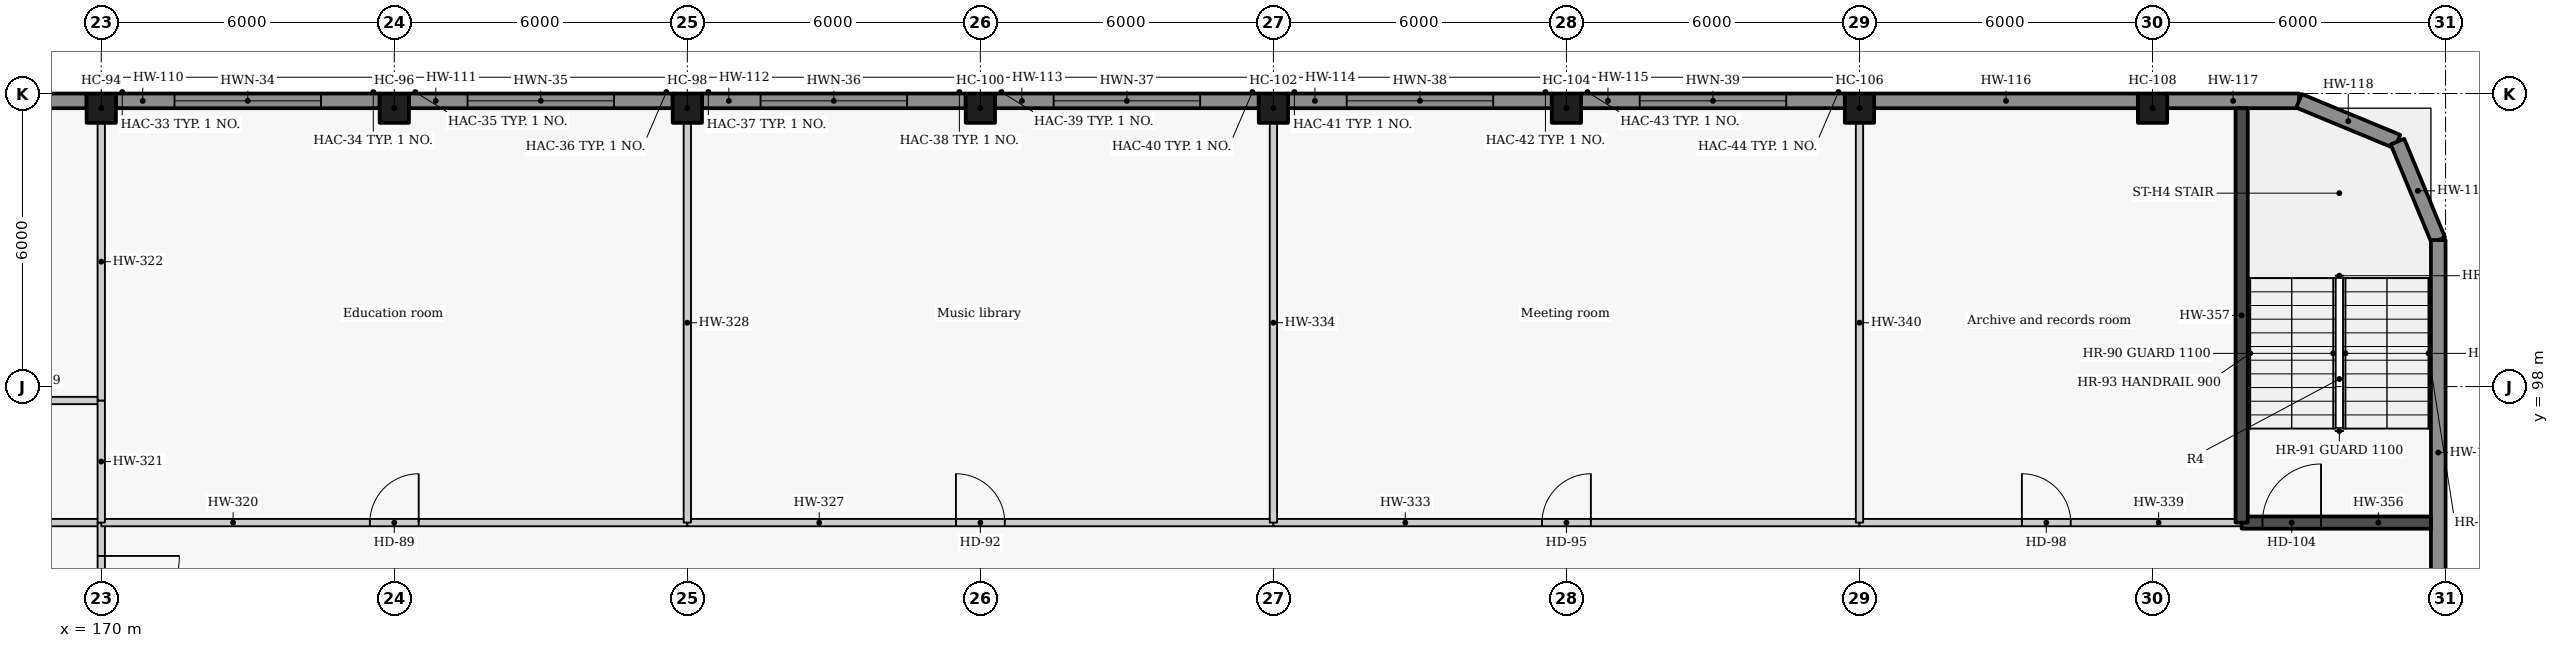
"""IFC4 building model, lengths in metres.
Left out: names, types, materials, properties, quantities, classifications, styles, units other than length and angle.
Written with IfcOpenShell. Run it as: python <this file> out.ifc"""

import sys

from ifc_helpers import new_model, si_unit, direction, frame, frame_2d, origin, origin_2d, place, context, subcontext, project, spatial, rectangle, extrude, element, fill, save


model = new_model("IFC4")
c1 = context("Model", 3, precision=1e-05, world=origin(), true_north=direction((0.0, 1.0)))
c2 = subcontext(c1, "Body", "Model", "MODEL_VIEW")
j1 = project(units=[si_unit("LENGTHUNIT", "METRE"), si_unit("PLANEANGLEUNIT", "RADIAN")], contexts=[c1])
p1 = place(None, origin())
s1 = spatial("IfcSite", under=j1, at=p1, CompositionType="ELEMENT")
p2 = place(p1, origin())
s2 = spatial("IfcBuilding", under=s1, at=p2, CompositionType="ELEMENT")
p3 = place(p2, frame((0.0, 0.0, 11.4)))
s3 = spatial("IfcBuildingStorey", under=s2, at=p3, CompositionType="ELEMENT", Elevation=11.4)
for number, where, z_axis, x_axis in (
    (1, (170.0, 103.7, 0.0), (0.0, 0.0, 1.0), (1.0, 0.0, 0.0)),
    (2, (176.0, 103.7, 0.0), (0.0, 0.0, 1.0), (1.0, 0.0, 0.0)),
    (3, (182.0, 103.7, 0.0), (0.0, 0.0, 1.0), (1.0, 0.0, 0.0)),
    (4, (188.0, 103.7, 0.0), (0.0, 0.0, 1.0), (1.0, 0.0, 0.0)),
    (5, (194.0, 103.7, 0.0), (0.0, 0.0, 1.0), (1.0, 0.0, 0.0)),
    (6, (200.0, 103.7, 0.0), (0.0, 0.0, 1.0), (1.0, 0.0, 0.0)),
    (7, (206.0, 103.7, 0.0), (0.0, 0.0, 1.0), (1.0, 0.0, 0.0)),
    (8, (212.0, 103.7, 0.0), (0.0, 0.0, 1.0), (1.0, 0.0, 0.0)),
):
    element("IfcColumn", number, at=place(p3, frame(where, z_axis=z_axis, x_axis=x_axis)), inside=s3, PredefinedType="COLUMN", context=c2, shape_type="SweptSolid", body=[
        extrude(rectangle(XDim=0.6, YDim=0.6, at=origin_2d()), origin(), (0.0, 0.0, 1.0), 4.2),
    ])
p4 = place(p3, frame((164.3, 103.85, 0.0), z_axis=(0.0, 0.0, 1.0), x_axis=(1.0, 0.0, 0.0)))
e9 = element("IfcWall", 9, at=p4, inside=s3, PredefinedType="SOLIDWALL", context=c2, shape_type="SweptSolid", body=[
    extrude(rectangle(XDim=5.4, YDim=0.3, at=frame_2d((2.7, 0.0))), origin(), (0.0, 0.0, 1.0), 4.2),
])
p5 = place(p3, frame((170.3, 103.85, 0.0), z_axis=(0.0, 0.0, 1.0), x_axis=(1.0, 0.0, 0.0)))
e10 = element("IfcWall", 10, at=p5, inside=s3, PredefinedType="SOLIDWALL", context=c2, shape_type="SweptSolid", body=[
    extrude(rectangle(XDim=5.4, YDim=0.3, at=frame_2d((2.7, 0.0))), origin(), (0.0, 0.0, 1.0), 4.2),
])
p6 = place(p5, frame((1.2, 0.0, 0.9)))
e11 = element("IfcOpeningElement", 11, at=p6, cuts=e10, PredefinedType="OPENING", context=c2, shape_type="SweptSolid", body=[
    extrude(rectangle(XDim=3.0, YDim=1.8, at=frame_2d((1.5, 0.9))), frame((0.0, 0.16, 0.0), z_axis=(0.0, -1.0, 0.0), x_axis=(1.0, 0.0, 0.0)), (0.0, 0.0, 1.0), 0.32),
])
p7 = place(p3, frame((176.3, 103.85, 0.0), z_axis=(0.0, 0.0, 1.0), x_axis=(1.0, 0.0, 0.0)))
e12 = element("IfcWall", 12, at=p7, inside=s3, PredefinedType="SOLIDWALL", context=c2, shape_type="SweptSolid", body=[
    extrude(rectangle(XDim=5.4, YDim=0.3, at=frame_2d((2.7, 0.0))), origin(), (0.0, 0.0, 1.0), 4.2),
])
p8 = place(p7, frame((1.2, 0.0, 0.9)))
e13 = element("IfcOpeningElement", 13, at=p8, cuts=e12, PredefinedType="OPENING", context=c2, shape_type="SweptSolid", body=[
    extrude(rectangle(XDim=3.0, YDim=1.8, at=frame_2d((1.5, 0.9))), frame((0.0, 0.16, 0.0), z_axis=(0.0, -1.0, 0.0), x_axis=(1.0, 0.0, 0.0)), (0.0, 0.0, 1.0), 0.32),
])
p9 = place(p3, frame((182.3, 103.85, 0.0), z_axis=(0.0, 0.0, 1.0), x_axis=(1.0, 0.0, 0.0)))
e14 = element("IfcWall", 14, at=p9, inside=s3, PredefinedType="SOLIDWALL", context=c2, shape_type="SweptSolid", body=[
    extrude(rectangle(XDim=5.4, YDim=0.3, at=frame_2d((2.7, 0.0))), origin(), (0.0, 0.0, 1.0), 4.2),
])
p10 = place(p9, frame((1.2, 0.0, 0.9)))
e15 = element("IfcOpeningElement", 15, at=p10, cuts=e14, PredefinedType="OPENING", context=c2, shape_type="SweptSolid", body=[
    extrude(rectangle(XDim=3.0, YDim=1.8, at=frame_2d((1.5, 0.9))), frame((0.0, 0.16, 0.0), z_axis=(0.0, -1.0, 0.0), x_axis=(1.0, 0.0, 0.0)), (0.0, 0.0, 1.0), 0.32),
])
p11 = place(p3, frame((188.3, 103.85, 0.0), z_axis=(0.0, 0.0, 1.0), x_axis=(1.0, 0.0, 0.0)))
e16 = element("IfcWall", 16, at=p11, inside=s3, PredefinedType="SOLIDWALL", context=c2, shape_type="SweptSolid", body=[
    extrude(rectangle(XDim=5.4, YDim=0.3, at=frame_2d((2.7, 0.0))), origin(), (0.0, 0.0, 1.0), 4.2),
])
p12 = place(p11, frame((1.2, 0.0, 0.9)))
e17 = element("IfcOpeningElement", 17, at=p12, cuts=e16, PredefinedType="OPENING", context=c2, shape_type="SweptSolid", body=[
    extrude(rectangle(XDim=3.0, YDim=1.8, at=frame_2d((1.5, 0.9))), frame((0.0, 0.16, 0.0), z_axis=(0.0, -1.0, 0.0), x_axis=(1.0, 0.0, 0.0)), (0.0, 0.0, 1.0), 0.32),
])
p13 = place(p3, frame((194.3, 103.85, 0.0), z_axis=(0.0, 0.0, 1.0), x_axis=(1.0, 0.0, 0.0)))
e18 = element("IfcWall", 18, at=p13, inside=s3, PredefinedType="SOLIDWALL", context=c2, shape_type="SweptSolid", body=[
    extrude(rectangle(XDim=5.4, YDim=0.3, at=frame_2d((2.7, 0.0))), origin(), (0.0, 0.0, 1.0), 4.2),
])
p14 = place(p13, frame((1.2, 0.0, 0.9)))
e19 = element("IfcOpeningElement", 19, at=p14, cuts=e18, PredefinedType="OPENING", context=c2, shape_type="SweptSolid", body=[
    extrude(rectangle(XDim=3.0, YDim=1.8, at=frame_2d((1.5, 0.9))), frame((0.0, 0.16, 0.0), z_axis=(0.0, -1.0, 0.0), x_axis=(1.0, 0.0, 0.0)), (0.0, 0.0, 1.0), 0.32),
])
p15 = place(p3, frame((200.3, 103.85, 0.0), z_axis=(0.0, 0.0, 1.0), x_axis=(1.0, 0.0, 0.0)))
e20 = element("IfcWall", 20, at=p15, inside=s3, PredefinedType="SOLIDWALL", context=c2, shape_type="SweptSolid", body=[
    extrude(rectangle(XDim=5.4, YDim=0.3, at=frame_2d((2.7, 0.0))), origin(), (0.0, 0.0, 1.0), 4.2),
])
p16 = place(p15, frame((1.2, 0.0, 0.9)))
e21 = element("IfcOpeningElement", 21, at=p16, cuts=e20, PredefinedType="OPENING", context=c2, shape_type="SweptSolid", body=[
    extrude(rectangle(XDim=3.0, YDim=1.8, at=frame_2d((1.5, 0.9))), frame((0.0, 0.16, 0.0), z_axis=(0.0, -1.0, 0.0), x_axis=(1.0, 0.0, 0.0)), (0.0, 0.0, 1.0), 0.32),
])
p17 = place(p3, frame((206.3, 103.85, 0.0), z_axis=(0.0, 0.0, 1.0), x_axis=(1.0, 0.0, 0.0)))
e22 = element("IfcWall", 22, at=p17, inside=s3, PredefinedType="SOLIDWALL", context=c2, shape_type="SweptSolid", body=[
    extrude(rectangle(XDim=5.4, YDim=0.3, at=frame_2d((2.7, 0.0))), origin(), (0.0, 0.0, 1.0), 4.2),
])
p18 = place(p3, frame((212.3, 103.85, 0.0), z_axis=(0.0, 0.0, 1.0), x_axis=(1.0, 0.0, 0.0)))
e23 = element("IfcWall", 23, at=p18, inside=s3, PredefinedType="SOLIDWALL", context=c2, shape_type="SweptSolid", body=[
    extrude(rectangle(XDim=2.7, YDim=0.3, at=frame_2d((1.35, 0.0))), origin(), (0.0, 0.0, 1.0), 4.2),
])
for number, where, z_axis, x_axis in (
    (24, (215.0, 103.85, 0.0), (0.0, 0.0, 1.0), (0.924, -0.383, 0.0)),
    (25, (217.015, 103.015, 0.0), (0.0, 0.0, 1.0), (0.383, -0.924, 0.0)),
):
    element("IfcWall", number, at=place(p3, frame(where, z_axis=z_axis, x_axis=x_axis)), inside=s3, PredefinedType="SOLIDWALL", context=c2, shape_type="SweptSolid", body=[
        extrude(rectangle(XDim=2.181, YDim=0.3, at=frame_2d((1.091, 0.0))), origin(), (0.0, 0.0, 1.0), 4.2),
    ])
p19 = place(p3, frame((217.85, 101.0, 0.0), z_axis=(0.0, 0.0, 1.0), x_axis=(0.0, -1.0, 0.0)))
e26 = element("IfcWall", 26, at=p19, inside=s3, PredefinedType="SOLIDWALL", context=c2, shape_type="SweptSolid", body=[
    extrude(rectangle(XDim=8.7, YDim=0.3, at=frame_2d((4.35, 0.0))), origin(), (0.0, 0.0, 1.0), 4.2),
])
p20 = place(p3, frame((156.175, 95.215, 0.0), z_axis=(0.0, 0.0, 1.0), x_axis=(1.0, 0.0, 0.0)))
e27 = element("IfcWall", 27, at=p20, inside=s3, PredefinedType="PARTITIONING", context=c2, shape_type="SweptSolid", body=[
    extrude(rectangle(XDim=13.825, YDim=0.15, at=frame_2d((6.913, 0.0))), origin(), (0.0, 0.0, 1.0), 3.85),
])
p21 = place(p20, frame((6.025, 0.0, 0.0)))
e28 = element("IfcOpeningElement", 28, at=p21, cuts=e27, PredefinedType="OPENING", context=c2, shape_type="SweptSolid", body=[
    extrude(rectangle(XDim=1.6, YDim=2.1, at=frame_2d((0.8, 1.05))), frame((0.0, 0.085, 0.0), z_axis=(0.0, -1.0, 0.0), x_axis=(1.0, 0.0, 0.0)), (0.0, 0.0, 1.0), 0.17),
])
p22 = place(p3, frame((164.3, 97.715, 0.0), z_axis=(0.0, 0.0, 1.0), x_axis=(1.0, 0.0, 0.0)))
e29 = element("IfcWall", 29, at=p22, inside=s3, PredefinedType="PLUMBINGWALL", context=c2, shape_type="SweptSolid", body=[
    extrude(rectangle(XDim=5.7, YDim=0.15, at=frame_2d((2.85, 0.0))), origin(), (0.0, 0.0, 1.0), 3.85),
])
p23 = place(p22, frame((2.0, 0.0, 0.0)))
e30 = element("IfcOpeningElement", 30, at=p23, cuts=e29, PredefinedType="OPENING", context=c2, shape_type="SweptSolid", body=[
    extrude(rectangle(XDim=0.9, YDim=2.1, at=frame_2d((0.45, 1.05))), frame((0.0, 0.085, 0.0), z_axis=(0.0, -1.0, 0.0), x_axis=(1.0, 0.0, 0.0)), (0.0, 0.0, 1.0), 0.17),
])
p24 = place(p3, frame((170.0, 95.215, 0.0), z_axis=(0.0, 0.0, 1.0), x_axis=(0.0, -1.0, 0.0)))
e31 = element("IfcWall", 31, at=p24, inside=s3, PredefinedType="PARTITIONING", context=c2, shape_type="SweptSolid", body=[
    extrude(rectangle(XDim=2.965, YDim=0.15, at=frame_2d((1.482, 0.0))), origin(), (0.0, 0.0, 1.0), 3.85),
])
p25 = place(p24, frame((0.683, 0.0, 0.0)))
e32 = element("IfcOpeningElement", 32, at=p25, cuts=e31, PredefinedType="OPENING", context=c2, shape_type="SweptSolid", body=[
    extrude(rectangle(XDim=1.6, YDim=2.1, at=frame_2d((0.8, 1.05))), frame((0.0, 0.085, 0.0), z_axis=(0.0, -1.0, 0.0), x_axis=(1.0, 0.0, 0.0)), (0.0, 0.0, 1.0), 0.17),
])
p26 = place(p3, frame((170.0, 95.215, 0.0), z_axis=(0.0, 0.0, 1.0), x_axis=(1.0, 0.0, 0.0)))
e33 = element("IfcWall", 33, at=p26, inside=s3, PredefinedType="PARTITIONING", context=c2, shape_type="SweptSolid", body=[
    extrude(rectangle(XDim=12.0, YDim=0.15, at=frame_2d((6.0, 0.0))), origin(), (0.0, 0.0, 1.0), 3.85),
])
p27 = place(p26, frame((5.5, 0.0, 0.0)))
e34 = element("IfcOpeningElement", 34, at=p27, cuts=e33, PredefinedType="OPENING", context=c2, shape_type="SweptSolid", body=[
    extrude(rectangle(XDim=1.0, YDim=2.1, at=frame_2d((0.5, 1.05))), frame((0.0, 0.085, 0.0), z_axis=(0.0, -1.0, 0.0), x_axis=(1.0, 0.0, 0.0)), (0.0, 0.0, 1.0), 0.17),
])
p28 = place(p3, frame((170.0, 97.715, 0.0), z_axis=(0.0, 0.0, 1.0), x_axis=(0.0, -1.0, 0.0)))
e35 = element("IfcWall", 35, at=p28, inside=s3, PredefinedType="PARTITIONING", context=c2, shape_type="SweptSolid", body=[
    extrude(rectangle(XDim=2.5, YDim=0.15, at=frame_2d((1.25, 0.0))), origin(), (0.0, 0.0, 1.0), 3.85),
])
p29 = place(p3, frame((170.0, 103.4, 0.0), z_axis=(0.0, 0.0, 1.0), x_axis=(0.0, -1.0, 0.0)))
e36 = element("IfcWall", 36, at=p29, inside=s3, PredefinedType="PLUMBINGWALL", context=c2, shape_type="SweptSolid", body=[
    extrude(rectangle(XDim=5.685, YDim=0.15, at=frame_2d((2.842, 0.0))), origin(), (0.0, 0.0, 1.0), 3.85),
])
p30 = place(p3, frame((182.0, 95.215, 0.0), z_axis=(0.0, 0.0, 1.0), x_axis=(1.0, 0.0, 0.0)))
e37 = element("IfcWall", 37, at=p30, inside=s3, PredefinedType="PARTITIONING", context=c2, shape_type="SweptSolid", body=[
    extrude(rectangle(XDim=12.0, YDim=0.15, at=frame_2d((6.0, 0.0))), origin(), (0.0, 0.0, 1.0), 3.85),
])
p31 = place(p30, frame((5.5, 0.0, 0.0)))
e38 = element("IfcOpeningElement", 38, at=p31, cuts=e37, PredefinedType="OPENING", context=c2, shape_type="SweptSolid", body=[
    extrude(rectangle(XDim=1.0, YDim=2.1, at=frame_2d((0.5, 1.05))), frame((0.0, 0.085, 0.0), z_axis=(0.0, -1.0, 0.0), x_axis=(1.0, 0.0, 0.0)), (0.0, 0.0, 1.0), 0.17),
])
p32 = place(p3, frame((182.0, 103.4, 0.0), z_axis=(0.0, 0.0, 1.0), x_axis=(0.0, -1.0, 0.0)))
e39 = element("IfcWall", 39, at=p32, inside=s3, PredefinedType="PARTITIONING", context=c2, shape_type="SweptSolid", body=[
    extrude(rectangle(XDim=8.185, YDim=0.15, at=frame_2d((4.092, 0.0))), origin(), (0.0, 0.0, 1.0), 3.85),
])
p33 = place(p3, frame((194.0, 95.215, 0.0), z_axis=(0.0, 0.0, 1.0), x_axis=(1.0, 0.0, 0.0)))
e40 = element("IfcWall", 40, at=p33, inside=s3, PredefinedType="PARTITIONING", context=c2, shape_type="SweptSolid", body=[
    extrude(rectangle(XDim=12.0, YDim=0.15, at=frame_2d((6.0, 0.0))), origin(), (0.0, 0.0, 1.0), 3.85),
])
p34 = place(p33, frame((5.5, 0.0, 0.0)))
e41 = element("IfcOpeningElement", 41, at=p34, cuts=e40, PredefinedType="OPENING", context=c2, shape_type="SweptSolid", body=[
    extrude(rectangle(XDim=1.0, YDim=2.1, at=frame_2d((0.5, 1.05))), frame((0.0, 0.085, 0.0), z_axis=(0.0, -1.0, 0.0), x_axis=(1.0, 0.0, 0.0)), (0.0, 0.0, 1.0), 0.17),
])
p35 = place(p3, frame((194.0, 103.4, 0.0), z_axis=(0.0, 0.0, 1.0), x_axis=(0.0, -1.0, 0.0)))
e42 = element("IfcWall", 42, at=p35, inside=s3, PredefinedType="PARTITIONING", context=c2, shape_type="SweptSolid", body=[
    extrude(rectangle(XDim=8.185, YDim=0.15, at=frame_2d((4.092, 0.0))), origin(), (0.0, 0.0, 1.0), 3.85),
])
p36 = place(p3, frame((206.0, 95.215, 0.0), z_axis=(0.0, 0.0, 1.0), x_axis=(1.0, 0.0, 0.0)))
e43 = element("IfcWall", 43, at=p36, inside=s3, PredefinedType="PARTITIONING", context=c2, shape_type="SweptSolid", body=[
    extrude(rectangle(XDim=7.825, YDim=0.15, at=frame_2d((3.913, 0.0))), origin(), (0.0, 0.0, 1.0), 3.85),
])
p37 = place(p36, frame((3.325, 0.0, 0.0)))
e44 = element("IfcOpeningElement", 44, at=p37, cuts=e43, PredefinedType="OPENING", context=c2, shape_type="SweptSolid", body=[
    extrude(rectangle(XDim=1.0, YDim=2.1, at=frame_2d((0.5, 1.05))), frame((0.0, 0.085, 0.0), z_axis=(0.0, -1.0, 0.0), x_axis=(1.0, 0.0, 0.0)), (0.0, 0.0, 1.0), 0.17),
])
p38 = place(p3, frame((206.0, 103.4, 0.0), z_axis=(0.0, 0.0, 1.0), x_axis=(0.0, -1.0, 0.0)))
e45 = element("IfcWall", 45, at=p38, inside=s3, PredefinedType="PARTITIONING", context=c2, shape_type="SweptSolid", body=[
    extrude(rectangle(XDim=8.185, YDim=0.15, at=frame_2d((4.092, 0.0))), origin(), (0.0, 0.0, 1.0), 3.85),
])
p39 = place(p3, frame((213.825, 95.215, 0.0), z_axis=(0.0, 0.0, 1.0), x_axis=(1.0, 0.0, 0.0)))
e46 = element("IfcWall", 46, at=p39, inside=s3, PredefinedType="SOLIDWALL", context=c2, shape_type="SweptSolid", body=[
    extrude(rectangle(XDim=3.875, YDim=0.25, at=frame_2d((1.938, 0.0))), origin(), (0.0, 0.0, 1.0), 4.2),
])
p40 = place(p39, frame((0.425, 0.0, 0.0)))
e47 = element("IfcOpeningElement", 47, at=p40, cuts=e46, PredefinedType="OPENING", context=c2, shape_type="SweptSolid", body=[
    extrude(rectangle(XDim=1.2, YDim=2.1, at=frame_2d((0.6, 1.05))), frame((0.0, 0.135, 0.0), z_axis=(0.0, -1.0, 0.0), x_axis=(1.0, 0.0, 0.0)), (0.0, 0.0, 1.0), 0.27),
])
p41 = place(p3, frame((213.825, 95.215, 0.0), z_axis=(0.0, 0.0, 1.0), x_axis=(0.0, 1.0, 0.0)))
e48 = element("IfcWall", 48, at=p41, inside=s3, PredefinedType="SOLIDWALL", context=c2, shape_type="SweptSolid", body=[
    extrude(rectangle(XDim=8.485, YDim=0.25, at=frame_2d((4.242, 0.0))), origin(), (0.0, 0.0, 1.0), 4.2),
])
p42 = place(p6, origin())
e49 = element("IfcWindow", 49, at=p42, inside=s3, PartitioningType="SINGLE_PANEL", PredefinedType="WINDOW", context=c2, shape_type="SweptSolid", body=[
    extrude(rectangle(XDim=3.0, YDim=1.8, at=frame_2d((1.5, 0.9))), frame((0.0, 0.03, 0.0), z_axis=(0.0, -1.0, 0.0), x_axis=(1.0, 0.0, 0.0)), (0.0, 0.0, 1.0), 0.06),
])
fill(e11, e49)
p43 = place(p8, origin())
e50 = element("IfcWindow", 50, at=p43, inside=s3, PartitioningType="SINGLE_PANEL", PredefinedType="WINDOW", context=c2, shape_type="SweptSolid", body=[
    extrude(rectangle(XDim=3.0, YDim=1.8, at=frame_2d((1.5, 0.9))), frame((0.0, 0.03, 0.0), z_axis=(0.0, -1.0, 0.0), x_axis=(1.0, 0.0, 0.0)), (0.0, 0.0, 1.0), 0.06),
])
fill(e13, e50)
p44 = place(p10, origin())
e51 = element("IfcWindow", 51, at=p44, inside=s3, PartitioningType="SINGLE_PANEL", PredefinedType="WINDOW", context=c2, shape_type="SweptSolid", body=[
    extrude(rectangle(XDim=3.0, YDim=1.8, at=frame_2d((1.5, 0.9))), frame((0.0, 0.03, 0.0), z_axis=(0.0, -1.0, 0.0), x_axis=(1.0, 0.0, 0.0)), (0.0, 0.0, 1.0), 0.06),
])
fill(e15, e51)
p45 = place(p12, origin())
e52 = element("IfcWindow", 52, at=p45, inside=s3, PartitioningType="SINGLE_PANEL", PredefinedType="WINDOW", context=c2, shape_type="SweptSolid", body=[
    extrude(rectangle(XDim=3.0, YDim=1.8, at=frame_2d((1.5, 0.9))), frame((0.0, 0.03, 0.0), z_axis=(0.0, -1.0, 0.0), x_axis=(1.0, 0.0, 0.0)), (0.0, 0.0, 1.0), 0.06),
])
fill(e17, e52)
p46 = place(p14, origin())
e53 = element("IfcWindow", 53, at=p46, inside=s3, PartitioningType="SINGLE_PANEL", PredefinedType="WINDOW", context=c2, shape_type="SweptSolid", body=[
    extrude(rectangle(XDim=3.0, YDim=1.8, at=frame_2d((1.5, 0.9))), frame((0.0, 0.03, 0.0), z_axis=(0.0, -1.0, 0.0), x_axis=(1.0, 0.0, 0.0)), (0.0, 0.0, 1.0), 0.06),
])
fill(e19, e53)
p47 = place(p16, origin())
e54 = element("IfcWindow", 54, at=p47, inside=s3, PartitioningType="SINGLE_PANEL", PredefinedType="WINDOW", context=c2, shape_type="SweptSolid", body=[
    extrude(rectangle(XDim=3.0, YDim=1.8, at=frame_2d((1.5, 0.9))), frame((0.0, 0.03, 0.0), z_axis=(0.0, -1.0, 0.0), x_axis=(1.0, 0.0, 0.0)), (0.0, 0.0, 1.0), 0.06),
])
fill(e21, e54)
p48 = place(p25, origin())
e55 = element("IfcDoor", 55, at=p48, inside=s3, OperationType="DOUBLE_DOOR_SINGLE_SWING", PredefinedType="DOOR", context=c2, shape_type="SweptSolid", body=[
    extrude(rectangle(XDim=1.6, YDim=2.1, at=frame_2d((0.8, 1.05))), frame((0.0, 0.025, 0.0), z_axis=(0.0, -1.0, 0.0), x_axis=(1.0, 0.0, 0.0)), (0.0, 0.0, 1.0), 0.05),
])
fill(e32, e55)
p49 = place(p27, origin())
e56 = element("IfcDoor", 56, at=p49, inside=s3, OperationType="SINGLE_SWING_RIGHT", PredefinedType="DOOR", context=c2, shape_type="SweptSolid", body=[
    extrude(rectangle(XDim=1.0, YDim=2.1, at=frame_2d((0.5, 1.05))), frame((0.0, 0.025, 0.0), z_axis=(0.0, -1.0, 0.0), x_axis=(1.0, 0.0, 0.0)), (0.0, 0.0, 1.0), 0.05),
])
fill(e34, e56)
p50 = place(p31, origin())
e57 = element("IfcDoor", 57, at=p50, inside=s3, OperationType="SINGLE_SWING_LEFT", PredefinedType="DOOR", context=c2, shape_type="SweptSolid", body=[
    extrude(rectangle(XDim=1.0, YDim=2.1, at=frame_2d((0.5, 1.05))), frame((0.0, 0.025, 0.0), z_axis=(0.0, -1.0, 0.0), x_axis=(1.0, 0.0, 0.0)), (0.0, 0.0, 1.0), 0.05),
])
fill(e38, e57)
p51 = place(p34, origin())
e58 = element("IfcDoor", 58, at=p51, inside=s3, OperationType="SINGLE_SWING_RIGHT", PredefinedType="DOOR", context=c2, shape_type="SweptSolid", body=[
    extrude(rectangle(XDim=1.0, YDim=2.1, at=frame_2d((0.5, 1.05))), frame((0.0, 0.025, 0.0), z_axis=(0.0, -1.0, 0.0), x_axis=(1.0, 0.0, 0.0)), (0.0, 0.0, 1.0), 0.05),
])
fill(e41, e58)
p52 = place(p37, origin())
e59 = element("IfcDoor", 59, at=p52, inside=s3, OperationType="SINGLE_SWING_LEFT", PredefinedType="DOOR", context=c2, shape_type="SweptSolid", body=[
    extrude(rectangle(XDim=1.0, YDim=2.1, at=frame_2d((0.5, 1.05))), frame((0.0, 0.025, 0.0), z_axis=(0.0, -1.0, 0.0), x_axis=(1.0, 0.0, 0.0)), (0.0, 0.0, 1.0), 0.05),
])
fill(e44, e59)
p53 = place(p40, origin())
e60 = element("IfcDoor", 60, at=p53, inside=s3, OperationType="SINGLE_SWING_RIGHT", PredefinedType="DOOR", context=c2, shape_type="SweptSolid", body=[
    extrude(rectangle(XDim=1.2, YDim=2.1, at=frame_2d((0.6, 1.05))), frame((0.0, 0.025, 0.0), z_axis=(0.0, -1.0, 0.0), x_axis=(1.0, 0.0, 0.0)), (0.0, 0.0, 1.0), 0.05),
])
fill(e47, e60)
save(model, sys.argv[1])
